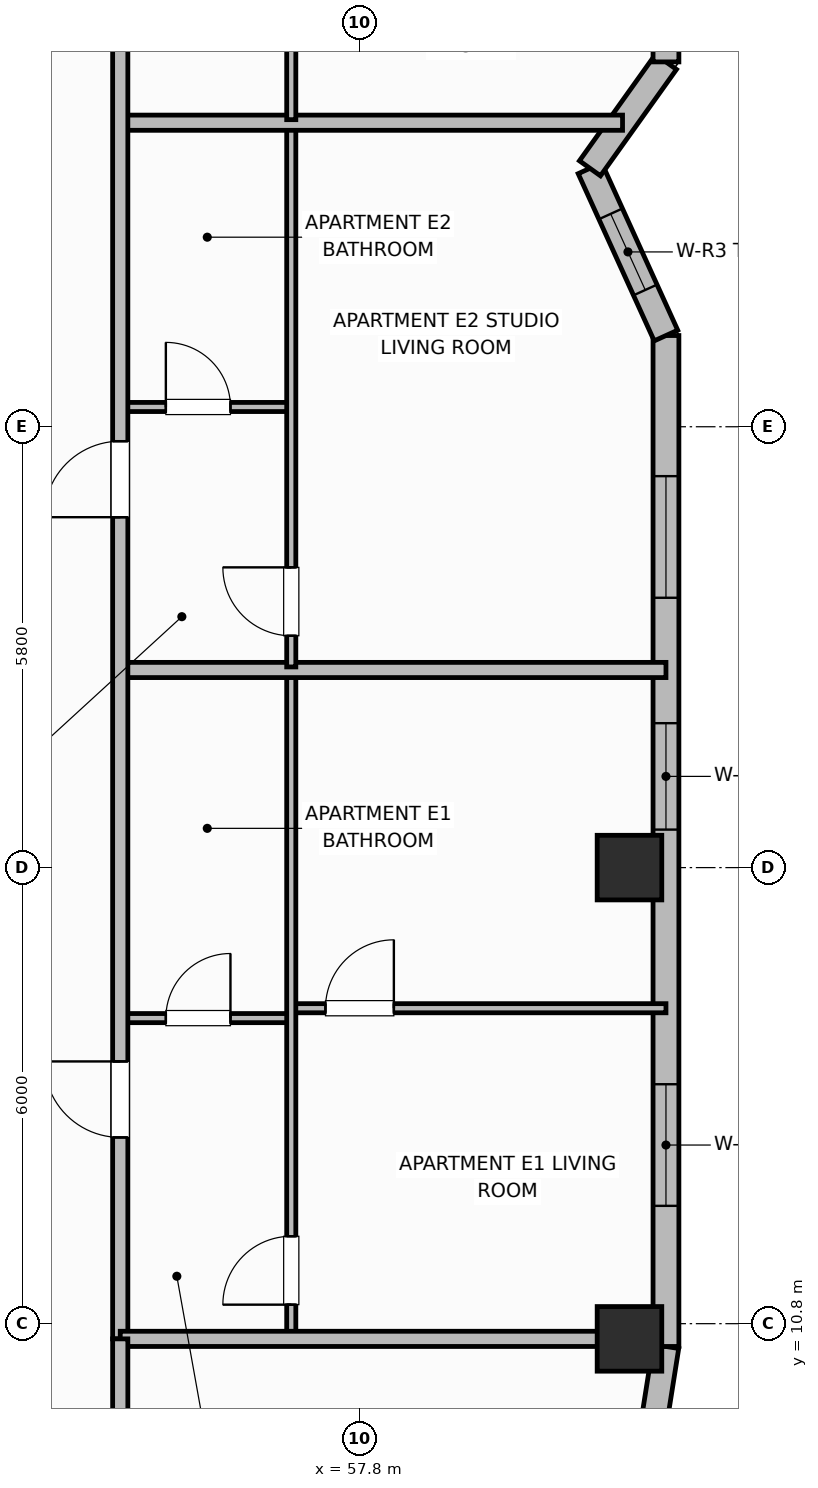
"""IFC4 building model, lengths in metres.
Left out: names, types, materials, properties, quantities, classifications, styles, units other than length and angle.
Written with IfcOpenShell. Run it as: python <this file> out.ifc"""

import sys

from ifc_helpers import new_model, si_unit, direction, frame, frame_2d, origin, origin_2d, place, context, subcontext, project, spatial, rectangle, extrude, element, fill, save


model = new_model("IFC4")
c1 = context("Model", 3, precision=1e-05, world=origin(), true_north=direction((0.0, 1.0)))
c2 = subcontext(c1, "Body", "Model", "MODEL_VIEW")
j1 = project(units=[si_unit("LENGTHUNIT", "METRE"), si_unit("PLANEANGLEUNIT", "RADIAN")], contexts=[c1])
p1 = place(None, origin())
s1 = spatial("IfcSite", under=j1, at=p1, CompositionType="ELEMENT")
p2 = place(p1, origin())
s2 = spatial("IfcBuilding", under=s1, at=p2, CompositionType="ELEMENT")
p3 = place(p2, frame((0.0, 0.0, 222.1)))
s3 = spatial("IfcBuildingStorey", under=s2, at=p3, CompositionType="ELEMENT", Elevation=222.1)
for number, where, z_axis, x_axis in (
    (1, (61.35, 10.6, 0.0), (0.0, 0.0, 1.0), (1.0, 0.0, 0.0)),
    (2, (61.35, 16.8, 0.0), (0.0, 0.0, 1.0), (1.0, 0.0, 0.0)),
):
    element("IfcColumn", number, at=place(p3, frame(where, z_axis=z_axis, x_axis=x_axis)), inside=s3, PredefinedType="COLUMN", context=c2, shape_type="SweptSolid", body=[
        extrude(rectangle(XDim=0.85, YDim=0.85, at=origin_2d()), origin(), (0.0, 0.0, 1.0), 3.7),
    ])
p4 = place(p3, frame((61.652, 9.378, 0.0), z_axis=(0.0, 0.0, 1.0), x_axis=(0.156514556949, 0.987675651954, 0.0)))
e3 = element("IfcWall", 3, at=p4, inside=s3, PredefinedType="SOLIDWALL", context=c2, shape_type="SweptSolid", body=[
    extrude(rectangle(XDim=1.135, YDim=0.34, at=frame_2d((0.568, 0.0))), origin(), (0.0, 0.0, 1.0), 2.26),
])
p5 = place(p3, frame((61.83, 10.5, 0.0), z_axis=(0.0, 0.0, 1.0), x_axis=(0.0, 1.0, 0.0)))
e4 = element("IfcWall", 4, at=p5, inside=s3, PredefinedType="SOLIDWALL", context=c2, shape_type="SweptSolid", body=[
    extrude(rectangle(XDim=13.3, YDim=0.34, at=frame_2d((6.65, 0.0))), origin(), (0.0, 0.0, 1.0), 2.26),
])
p6 = place(p5, frame((1.85, 0.0, 0.3)))
e5 = element("IfcOpeningElement", 5, at=p6, cuts=e4, PredefinedType="OPENING", context=c2, shape_type="SweptSolid", body=[
    extrude(rectangle(XDim=1.6, YDim=1.9, at=frame_2d((0.8, 0.95))), frame((0.0, 0.18, 0.0), z_axis=(0.0, -1.0, 0.0), x_axis=(1.0, 0.0, 0.0)), (0.0, 0.0, 1.0), 0.36),
])
p7 = place(p5, frame((6.8, 0.0, 0.35)))
e6 = element("IfcOpeningElement", 6, at=p7, cuts=e4, PredefinedType="OPENING", context=c2, shape_type="SweptSolid", body=[
    extrude(rectangle(XDim=1.4, YDim=1.85, at=frame_2d((0.7, 0.925))), frame((0.0, 0.18, 0.0), z_axis=(0.0, -1.0, 0.0), x_axis=(1.0, 0.0, 0.0)), (0.0, 0.0, 1.0), 0.36),
])
p8 = place(p5, frame((9.85, 0.0, 0.3)))
e7 = element("IfcOpeningElement", 7, at=p8, cuts=e4, PredefinedType="OPENING", context=c2, shape_type="SweptSolid", body=[
    extrude(rectangle(XDim=1.6, YDim=1.9, at=frame_2d((0.8, 0.95))), frame((0.0, 0.18, 0.0), z_axis=(0.0, -1.0, 0.0), x_axis=(1.0, 0.0, 0.0)), (0.0, 0.0, 1.0), 0.36),
])
p9 = place(p3, frame((61.83, 23.8, 0.0), z_axis=(0.0, 0.0, 1.0), x_axis=(-0.413810555983, 0.910363017569, 0.0)))
e8 = element("IfcWall", 8, at=p9, inside=s3, PredefinedType="SOLIDWALL", context=c2, shape_type="SweptSolid", body=[
    extrude(rectangle(XDim=2.417, YDim=0.34, at=frame_2d((1.208, 0.0))), origin(), (0.0, 0.0, 1.0), 2.26),
])
p10 = place(p9, frame((0.658, 0.0, 0.45)))
e9 = element("IfcOpeningElement", 9, at=p10, cuts=e8, PredefinedType="OPENING", context=c2, shape_type="SweptSolid", body=[
    extrude(rectangle(XDim=1.1, YDim=1.65, at=frame_2d((0.55, 0.825))), frame((0.0, 0.18, 0.0), z_axis=(0.0, -1.0, 0.0), x_axis=(1.0, 0.0, 0.0)), (0.0, 0.0, 1.0), 0.36),
])
p11 = place(p3, frame((60.83, 26.0, 0.0), z_axis=(0.0, 0.0, 1.0), x_axis=(0.581265041318, 0.813714293681, 0.0)))
e10 = element("IfcWall", 10, at=p11, inside=s3, PredefinedType="SOLIDWALL", context=c2, shape_type="SweptSolid", body=[
    extrude(rectangle(XDim=1.72, YDim=0.34, at=frame_2d((0.86, 0.0))), origin(), (0.0, 0.0, 1.0), 2.26),
])
p12 = place(p3, frame((61.83, 27.4, 0.0), z_axis=(0.0, 0.0, 1.0), x_axis=(0.0, 1.0, 0.0)))
e11 = element("IfcWall", 11, at=p12, inside=s3, PredefinedType="SOLIDWALL", context=c2, shape_type="SweptSolid", body=[
    extrude(rectangle(XDim=1.6, YDim=0.34, at=frame_2d((0.8, 0.0))), origin(), (0.0, 0.0, 1.0), 2.26),
])
p13 = place(p3, frame((54.65, 14.82, 0.0), z_axis=(0.0, 0.0, 1.0), x_axis=(1.0, 0.0, 0.0)))
e12 = element("IfcWall", 12, at=p13, inside=s3, PredefinedType="PARTITIONING", context=c2, shape_type="SweptSolid", body=[
    extrude(rectangle(XDim=2.25, YDim=0.12, at=frame_2d((1.125, 0.0))), origin(), (0.0, 0.0, 1.0), 2.24),
])
p14 = place(p13, frame((0.6, 0.0, 0.0)))
e13 = element("IfcOpeningElement", 13, at=p14, cuts=e12, PredefinedType="OPENING", context=c2, shape_type="SweptSolid", body=[
    extrude(rectangle(XDim=0.85, YDim=2.1, at=frame_2d((0.425, 1.05))), frame((0.0, 0.07, 0.0), z_axis=(0.0, -1.0, 0.0), x_axis=(1.0, 0.0, 0.0)), (0.0, 0.0, 1.0), 0.14),
])
p15 = place(p3, frame((56.9, 14.95, 0.0), z_axis=(0.0, 0.0, 1.0), x_axis=(1.0, 0.0, 0.0)))
e14 = element("IfcWall", 14, at=p15, inside=s3, PredefinedType="PARTITIONING", context=c2, shape_type="SweptSolid", body=[
    extrude(rectangle(XDim=4.93, YDim=0.12, at=frame_2d((2.465, 0.0))), origin(), (0.0, 0.0, 1.0), 2.24),
])
p16 = place(p15, frame((0.45, 0.0, 0.0)))
e15 = element("IfcOpeningElement", 15, at=p16, cuts=e14, PredefinedType="OPENING", context=c2, shape_type="SweptSolid", body=[
    extrude(rectangle(XDim=0.9, YDim=2.1, at=frame_2d((0.45, 1.05))), frame((0.0, 0.07, 0.0), z_axis=(0.0, -1.0, 0.0), x_axis=(1.0, 0.0, 0.0)), (0.0, 0.0, 1.0), 0.14),
])
p17 = place(p3, frame((56.9, 10.64, 0.0), z_axis=(0.0, 0.0, 1.0), x_axis=(0.0, 1.0, 0.0)))
e16 = element("IfcWall", 16, at=p17, inside=s3, PredefinedType="PARTITIONING", context=c2, shape_type="SweptSolid", body=[
    extrude(rectangle(XDim=8.72, YDim=0.12, at=frame_2d((4.36, 0.0))), origin(), (0.0, 0.0, 1.0), 2.24),
])
p18 = place(p17, frame((0.41, 0.0, 0.0)))
e17 = element("IfcOpeningElement", 17, at=p18, cuts=e16, PredefinedType="OPENING", context=c2, shape_type="SweptSolid", body=[
    extrude(rectangle(XDim=0.9, YDim=2.1, at=frame_2d((0.45, 1.05))), frame((0.0, 0.07, 0.0), z_axis=(0.0, -1.0, 0.0), x_axis=(1.0, 0.0, 0.0)), (0.0, 0.0, 1.0), 0.14),
])
p19 = place(p3, frame((54.65, 19.4, 0.0), z_axis=(0.0, 0.0, 1.0), x_axis=(1.0, 0.0, 0.0)))
e18 = element("IfcWall", 18, at=p19, inside=s3, PredefinedType="PARTITIONING", context=c2, shape_type="SweptSolid", body=[
    extrude(rectangle(XDim=7.18, YDim=0.2, at=frame_2d((3.59, 0.0))), origin(), (0.0, 0.0, 1.0), 2.24),
])
p20 = place(p3, frame((54.65, 22.86, 0.0), z_axis=(0.0, 0.0, 1.0), x_axis=(1.0, 0.0, 0.0)))
e19 = element("IfcWall", 19, at=p20, inside=s3, PredefinedType="PARTITIONING", context=c2, shape_type="SweptSolid", body=[
    extrude(rectangle(XDim=2.25, YDim=0.12, at=frame_2d((1.125, 0.0))), origin(), (0.0, 0.0, 1.0), 2.24),
])
p21 = place(p20, frame((0.6, 0.0, 0.0)))
e20 = element("IfcOpeningElement", 20, at=p21, cuts=e19, PredefinedType="OPENING", context=c2, shape_type="SweptSolid", body=[
    extrude(rectangle(XDim=0.85, YDim=2.1, at=frame_2d((0.425, 1.05))), frame((0.0, 0.07, 0.0), z_axis=(0.0, -1.0, 0.0), x_axis=(1.0, 0.0, 0.0)), (0.0, 0.0, 1.0), 0.14),
])
p22 = place(p3, frame((56.9, 19.44, 0.0), z_axis=(0.0, 0.0, 1.0), x_axis=(0.0, 1.0, 0.0)))
e21 = element("IfcWall", 21, at=p22, inside=s3, PredefinedType="PARTITIONING", context=c2, shape_type="SweptSolid", body=[
    extrude(rectangle(XDim=7.12, YDim=0.12, at=frame_2d((3.56, 0.0))), origin(), (0.0, 0.0, 1.0), 2.24),
])
p23 = place(p22, frame((0.41, 0.0, 0.0)))
e22 = element("IfcOpeningElement", 22, at=p23, cuts=e21, PredefinedType="OPENING", context=c2, shape_type="SweptSolid", body=[
    extrude(rectangle(XDim=0.9, YDim=2.1, at=frame_2d((0.45, 1.05))), frame((0.0, 0.07, 0.0), z_axis=(0.0, -1.0, 0.0), x_axis=(1.0, 0.0, 0.0)), (0.0, 0.0, 1.0), 0.14),
])
p24 = place(p3, frame((54.65, 26.6, 0.0), z_axis=(0.0, 0.0, 1.0), x_axis=(1.0, 0.0, 0.0)))
e23 = element("IfcWall", 23, at=p24, inside=s3, PredefinedType="PARTITIONING", context=c2, shape_type="SweptSolid", body=[
    extrude(rectangle(XDim=6.609, YDim=0.2, at=frame_2d((3.304, 0.0))), origin(), (0.0, 0.0, 1.0), 2.24),
])
p25 = place(p3, frame((56.9, 26.64, 0.0), z_axis=(0.0, 0.0, 1.0), x_axis=(0.0, 1.0, 0.0)))
e24 = element("IfcWall", 24, at=p25, inside=s3, PredefinedType="PARTITIONING", context=c2, shape_type="SweptSolid", body=[
    extrude(rectangle(XDim=10.32, YDim=0.12, at=frame_2d((5.16, 0.0))), origin(), (0.0, 0.0, 1.0), 2.24),
])
p26 = place(p25, frame((2.81, 0.0, 0.0)))
e25 = element("IfcOpeningElement", 25, at=p26, cuts=e24, PredefinedType="OPENING", context=c2, shape_type="SweptSolid", body=[
    extrude(rectangle(XDim=0.9, YDim=2.1, at=frame_2d((0.45, 1.05))), frame((0.0, 0.07, 0.0), z_axis=(0.0, -1.0, 0.0), x_axis=(1.0, 0.0, 0.0)), (0.0, 0.0, 1.0), 0.14),
])
p27 = place(p3, frame((54.65, 10.6, 0.0), z_axis=(0.0, 0.0, 1.0), x_axis=(0.0, 1.0, 0.0)))
e26 = element("IfcWall", 26, at=p27, inside=s3, PredefinedType="PARTITIONING", context=c2, shape_type="SweptSolid", body=[
    extrude(rectangle(XDim=35.2, YDim=0.2, at=frame_2d((17.6, 0.0))), origin(), (0.0, 0.0, 1.0), 2.24),
])
p28 = place(p27, frame((2.65, 0.0, 0.0)))
e27 = element("IfcOpeningElement", 27, at=p28, cuts=e26, PredefinedType="OPENING", context=c2, shape_type="SweptSolid", body=[
    extrude(rectangle(XDim=1.0, YDim=2.15, at=frame_2d((0.5, 1.075))), frame((0.0, 0.11, 0.0), z_axis=(0.0, -1.0, 0.0), x_axis=(1.0, 0.0, 0.0)), (0.0, 0.0, 1.0), 0.22),
])
p29 = place(p27, frame((10.81, 0.0, 0.0)))
e28 = element("IfcOpeningElement", 28, at=p29, cuts=e26, PredefinedType="OPENING", context=c2, shape_type="SweptSolid", body=[
    extrude(rectangle(XDim=1.0, YDim=2.15, at=frame_2d((0.5, 1.075))), frame((0.0, 0.11, 0.0), z_axis=(0.0, -1.0, 0.0), x_axis=(1.0, 0.0, 0.0)), (0.0, 0.0, 1.0), 0.22),
])
p30 = place(p27, frame((19.54, 0.0, 0.0)))
e29 = element("IfcOpeningElement", 29, at=p30, cuts=e26, PredefinedType="OPENING", context=c2, shape_type="SweptSolid", body=[
    extrude(rectangle(XDim=1.0, YDim=2.15, at=frame_2d((0.5, 1.075))), frame((0.0, 0.11, 0.0), z_axis=(0.0, -1.0, 0.0), x_axis=(1.0, 0.0, 0.0)), (0.0, 0.0, 1.0), 0.22),
])
p31 = place(p27, frame((26.95, 0.0, 0.0)))
e30 = element("IfcOpeningElement", 30, at=p31, cuts=e26, PredefinedType="OPENING", context=c2, shape_type="SweptSolid", body=[
    extrude(rectangle(XDim=1.0, YDim=2.15, at=frame_2d((0.5, 1.075))), frame((0.0, 0.11, 0.0), z_axis=(0.0, -1.0, 0.0), x_axis=(1.0, 0.0, 0.0)), (0.0, 0.0, 1.0), 0.22),
])
p32 = place(p3, frame((54.65, 10.6, 0.0), z_axis=(0.0, 0.0, 1.0), x_axis=(1.0, 0.0, 0.0)))
e31 = element("IfcWall", 31, at=p32, inside=s3, PredefinedType="PARTITIONING", context=c2, shape_type="SweptSolid", body=[
    extrude(rectangle(XDim=6.76, YDim=0.2, at=frame_2d((3.38, 0.0))), origin(), (0.0, 0.0, 1.0), 2.24),
])
p33 = place(p3, frame((54.65, 6.87, 0.0), z_axis=(0.0, 0.0, 1.0), x_axis=(0.0, 1.0, 0.0)))
e32 = element("IfcWall", 32, at=p33, inside=s3, PredefinedType="PARTITIONING", context=c2, shape_type="SweptSolid", body=[
    extrude(rectangle(XDim=3.73, YDim=0.2, at=frame_2d((1.865, 0.0))), origin(), (0.0, 0.0, 1.0), 2.24),
])
p34 = place(p6, origin())
e33 = element("IfcWindow", 33, at=p34, inside=s3, PartitioningType="SINGLE_PANEL", PredefinedType="WINDOW", context=c2, shape_type="SweptSolid", body=[
    extrude(rectangle(XDim=1.6, YDim=1.9, at=frame_2d((0.8, 0.95))), frame((0.0, 0.03, 0.0), z_axis=(0.0, -1.0, 0.0), x_axis=(1.0, 0.0, 0.0)), (0.0, 0.0, 1.0), 0.06),
])
fill(e5, e33)
p35 = place(p7, origin())
e34 = element("IfcWindow", 34, at=p35, inside=s3, PartitioningType="SINGLE_PANEL", PredefinedType="WINDOW", context=c2, shape_type="SweptSolid", body=[
    extrude(rectangle(XDim=1.4, YDim=1.85, at=frame_2d((0.7, 0.925))), frame((0.0, 0.03, 0.0), z_axis=(0.0, -1.0, 0.0), x_axis=(1.0, 0.0, 0.0)), (0.0, 0.0, 1.0), 0.06),
])
fill(e6, e34)
p36 = place(p8, origin())
e35 = element("IfcWindow", 35, at=p36, inside=s3, PartitioningType="SINGLE_PANEL", PredefinedType="WINDOW", context=c2, shape_type="SweptSolid", body=[
    extrude(rectangle(XDim=1.6, YDim=1.9, at=frame_2d((0.8, 0.95))), frame((0.0, 0.03, 0.0), z_axis=(0.0, -1.0, 0.0), x_axis=(1.0, 0.0, 0.0)), (0.0, 0.0, 1.0), 0.06),
])
fill(e7, e35)
p37 = place(p10, origin())
e36 = element("IfcWindow", 36, at=p37, inside=s3, PartitioningType="SINGLE_PANEL", PredefinedType="WINDOW", context=c2, shape_type="SweptSolid", body=[
    extrude(rectangle(XDim=1.1, YDim=1.65, at=frame_2d((0.55, 0.825))), frame((0.0, 0.03, 0.0), z_axis=(0.0, -1.0, 0.0), x_axis=(1.0, 0.0, 0.0)), (0.0, 0.0, 1.0), 0.06),
])
fill(e9, e36)
p38 = place(p14, origin())
e37 = element("IfcDoor", 37, at=p38, inside=s3, OperationType="SINGLE_SWING_RIGHT", PredefinedType="DOOR", context=c2, shape_type="SweptSolid", body=[
    extrude(rectangle(XDim=0.85, YDim=2.1, at=frame_2d((0.425, 1.05))), frame((0.0, 0.025, 0.0), z_axis=(0.0, -1.0, 0.0), x_axis=(1.0, 0.0, 0.0)), (0.0, 0.0, 1.0), 0.05),
])
fill(e13, e37)
p39 = place(p16, origin())
e38 = element("IfcDoor", 38, at=p39, inside=s3, OperationType="SINGLE_SWING_RIGHT", PredefinedType="DOOR", context=c2, shape_type="SweptSolid", body=[
    extrude(rectangle(XDim=0.9, YDim=2.1, at=frame_2d((0.45, 1.05))), frame((0.0, 0.025, 0.0), z_axis=(0.0, -1.0, 0.0), x_axis=(1.0, 0.0, 0.0)), (0.0, 0.0, 1.0), 0.05),
])
fill(e15, e38)
p40 = place(p18, origin())
e39 = element("IfcDoor", 39, at=p40, inside=s3, OperationType="SINGLE_SWING_LEFT", PredefinedType="DOOR", context=c2, shape_type="SweptSolid", body=[
    extrude(rectangle(XDim=0.9, YDim=2.1, at=frame_2d((0.45, 1.05))), frame((0.0, 0.025, 0.0), z_axis=(0.0, -1.0, 0.0), x_axis=(1.0, 0.0, 0.0)), (0.0, 0.0, 1.0), 0.05),
])
fill(e17, e39)
p41 = place(p21, origin())
e40 = element("IfcDoor", 40, at=p41, inside=s3, OperationType="SINGLE_SWING_LEFT", PredefinedType="DOOR", context=c2, shape_type="SweptSolid", body=[
    extrude(rectangle(XDim=0.85, YDim=2.1, at=frame_2d((0.425, 1.05))), frame((0.0, 0.025, 0.0), z_axis=(0.0, -1.0, 0.0), x_axis=(1.0, 0.0, 0.0)), (0.0, 0.0, 1.0), 0.05),
])
fill(e20, e40)
p42 = place(p23, origin())
e41 = element("IfcDoor", 41, at=p42, inside=s3, OperationType="SINGLE_SWING_RIGHT", PredefinedType="DOOR", context=c2, shape_type="SweptSolid", body=[
    extrude(rectangle(XDim=0.9, YDim=2.1, at=frame_2d((0.45, 1.05))), frame((0.0, 0.025, 0.0), z_axis=(0.0, -1.0, 0.0), x_axis=(1.0, 0.0, 0.0)), (0.0, 0.0, 1.0), 0.05),
])
fill(e22, e41)
p43 = place(p28, origin())
e42 = element("IfcDoor", 42, at=p43, inside=s3, OperationType="SINGLE_SWING_RIGHT", PredefinedType="DOOR", context=c2, shape_type="SweptSolid", body=[
    extrude(rectangle(XDim=1.0, YDim=2.15, at=frame_2d((0.5, 1.075))), frame((0.0, 0.025, 0.0), z_axis=(0.0, -1.0, 0.0), x_axis=(1.0, 0.0, 0.0)), (0.0, 0.0, 1.0), 0.05),
])
fill(e27, e42)
p44 = place(p29, origin())
e43 = element("IfcDoor", 43, at=p44, inside=s3, OperationType="SINGLE_SWING_LEFT", PredefinedType="DOOR", context=c2, shape_type="SweptSolid", body=[
    extrude(rectangle(XDim=1.0, YDim=2.15, at=frame_2d((0.5, 1.075))), frame((0.0, 0.025, 0.0), z_axis=(0.0, -1.0, 0.0), x_axis=(1.0, 0.0, 0.0)), (0.0, 0.0, 1.0), 0.05),
])
fill(e28, e43)
save(model, sys.argv[1])
